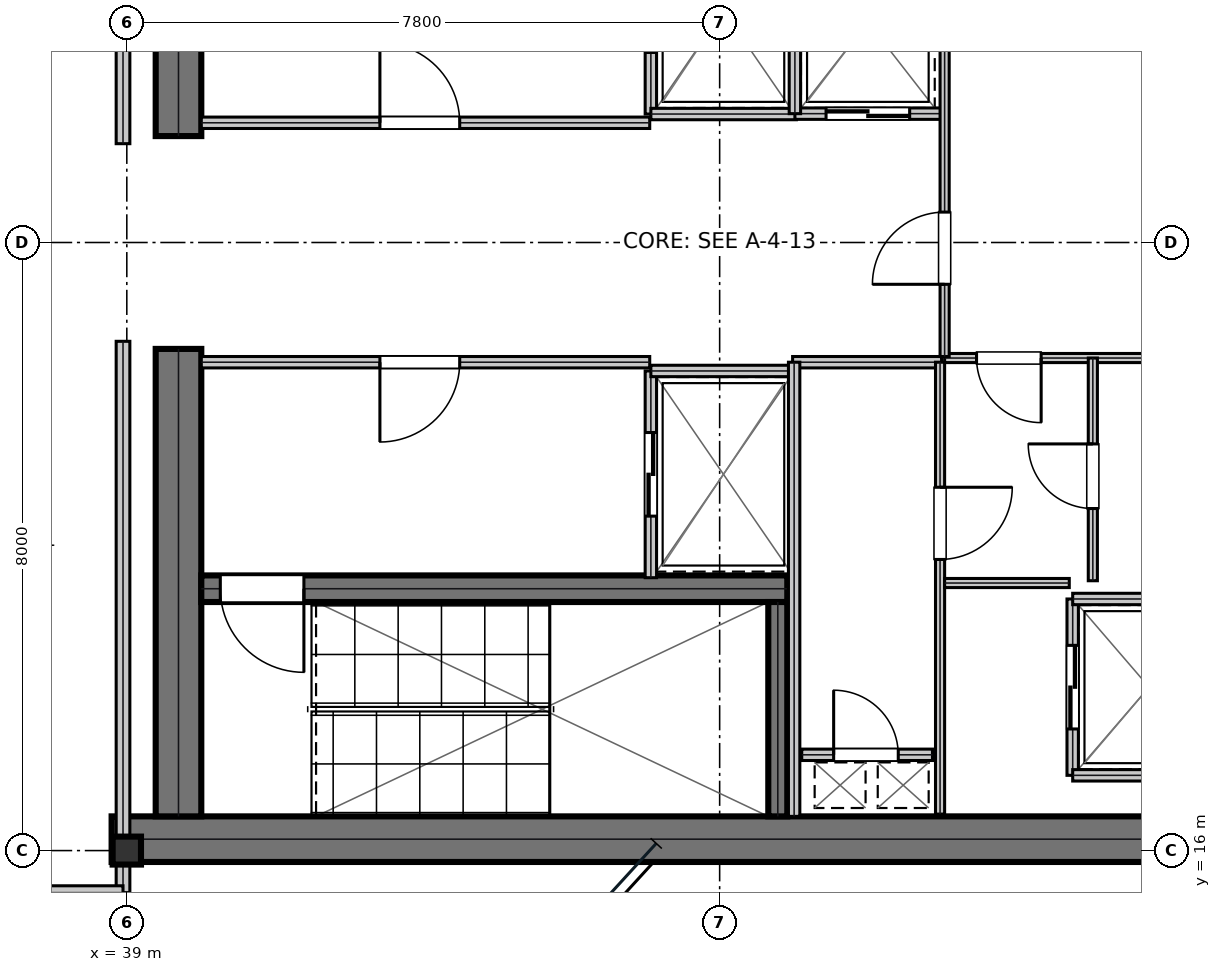
"""IFC4 building model, lengths in metres.
Left out: names, types, materials, properties, quantities, classifications, styles, units other than length and angle.
Written with IfcOpenShell. Run it as: python <this file> out.ifc"""

import sys

from ifc_helpers import new_model, si_unit, direction, frame, frame_2d, origin, origin_2d, place, context, subcontext, project, spatial, rectangle, i_section, extrude, element, fill, save


model = new_model("IFC4")
c1 = context("Model", 3, precision=1e-05, world=origin(), true_north=direction((0.0, 1.0)))
c2 = subcontext(c1, "Body", "Model", "MODEL_VIEW")
j1 = project(units=[si_unit("LENGTHUNIT", "METRE"), si_unit("PLANEANGLEUNIT", "RADIAN")], contexts=[c1])
p1 = place(None, origin())
s1 = spatial("IfcSite", under=j1, at=p1, CompositionType="ELEMENT")
p2 = place(p1, origin())
s2 = spatial("IfcBuilding", under=s1, at=p2, CompositionType="ELEMENT")
p3 = place(p2, frame((0.0, 0.0, 287.1)))
s3 = spatial("IfcBuildingStorey", under=s2, at=p3, CompositionType="ELEMENT", Elevation=287.1)
p4 = place(p3, frame((38.8, 16.15, 0.0), z_axis=(0.0, 0.0, 1.0), x_axis=(1.0, 0.0, 0.0)))
e1 = element("IfcWall", 1, at=p4, inside=s3, PredefinedType="SHEAR", context=c2, shape_type="SweptSolid", body=[
    extrude(rectangle(XDim=16.0, YDim=0.6, at=frame_2d((8.0, 0.0))), origin(), (0.0, 0.0, 1.0), 3.81),
])
for number, where, z_axis, x_axis in (
    (2, (39.68, 16.45, 0.0), (0.0, 0.0, 1.0), (0.0, 1.0, 0.0)),
    (3, (39.68, 25.4, 0.0), (0.0, 0.0, 1.0), (0.0, 1.0, 0.0)),
):
    element("IfcWall", number, at=place(p3, frame(where, z_axis=z_axis, x_axis=x_axis)), inside=s3, PredefinedType="SHEAR", context=c2, shape_type="SweptSolid", body=[
        extrude(rectangle(XDim=6.15, YDim=0.6, at=frame_2d((3.075, 0.0))), origin(), (0.0, 0.0, 1.0), 3.81),
    ])
p5 = place(p3, frame((39.98, 19.445, 0.0), z_axis=(0.0, 0.0, 1.0), x_axis=(1.0, 0.0, 0.0)))
e4 = element("IfcWall", 4, at=p5, inside=s3, PredefinedType="SHEAR", context=c2, shape_type="SweptSolid", body=[
    extrude(rectangle(XDim=7.71, YDim=0.35, at=frame_2d((3.855, 0.0))), origin(), (0.0, 0.0, 1.0), 3.81),
])
p6 = place(p5, frame((0.25, 0.0, 0.0)))
e5 = element("IfcOpeningElement", 5, at=p6, cuts=e4, PredefinedType="OPENING", context=c2, shape_type="SweptSolid", body=[
    extrude(rectangle(XDim=1.1, YDim=2.15, at=frame_2d((0.55, 1.075))), frame((0.0, 0.185, 0.0), z_axis=(0.0, -1.0, 0.0), x_axis=(1.0, 0.0, 0.0)), (0.0, 0.0, 1.0), 0.37),
])
p7 = place(p3, frame((47.565, 16.45, 0.0), z_axis=(0.0, 0.0, 1.0), x_axis=(0.0, 1.0, 0.0)))
e6 = element("IfcWall", 6, at=p7, inside=s3, PredefinedType="SHEAR", context=c2, shape_type="SweptSolid", body=[
    extrude(rectangle(XDim=2.82, YDim=0.25, at=frame_2d((1.41, 0.0))), origin(), (0.0, 0.0, 1.0), 3.81),
])
p8 = place(p3, frame((39.0, 16.0, 0.0), z_axis=(0.0, 0.0, 1.0), x_axis=(1.0, 0.0, 0.0)))
e7 = element("IfcColumn", 7, at=p8, inside=s3, PredefinedType="COLUMN", context=c2, shape_type="SweptSolid", body=[
    extrude(i_section(OverallWidth=0.373, OverallDepth=0.368, WebThickness=0.015, FlangeThickness=0.024, at=origin_2d()), origin(), (0.0, 0.0, 1.0), 4.044),
])
p9 = place(p3, frame((39.98, 25.575, 0.0), z_axis=(0.0, 0.0, 1.0), x_axis=(1.0, 0.0, 0.0)))
e8 = element("IfcWall", 8, at=p9, inside=s3, PredefinedType="PARTITIONING", context=c2, shape_type="SweptSolid", body=[
    extrude(rectangle(XDim=5.9, YDim=0.15, at=frame_2d((2.95, 0.0))), origin(), (0.0, 0.0, 1.0), 3.81),
])
p10 = place(p9, frame((2.35, 0.0, 0.0)))
e9 = element("IfcOpeningElement", 9, at=p10, cuts=e8, PredefinedType="OPENING", context=c2, shape_type="SweptSolid", body=[
    extrude(rectangle(XDim=1.05, YDim=2.15, at=frame_2d((0.525, 1.075))), frame((0.0, 0.085, 0.0), z_axis=(0.0, -1.0, 0.0), x_axis=(1.0, 0.0, 0.0)), (0.0, 0.0, 1.0), 0.17),
])
p11 = place(p3, frame((39.98, 22.425, 0.0), z_axis=(0.0, 0.0, 1.0), x_axis=(1.0, 0.0, 0.0)))
e10 = element("IfcWall", 10, at=p11, inside=s3, PredefinedType="PARTITIONING", context=c2, shape_type="SweptSolid", body=[
    extrude(rectangle(XDim=5.9, YDim=0.15, at=frame_2d((2.95, 0.0))), origin(), (0.0, 0.0, 1.0), 3.81),
])
p12 = place(p11, frame((2.35, 0.0, 0.0)))
e11 = element("IfcOpeningElement", 11, at=p12, cuts=e10, PredefinedType="OPENING", context=c2, shape_type="SweptSolid", body=[
    extrude(rectangle(XDim=1.05, YDim=2.15, at=frame_2d((0.525, 1.075))), frame((0.0, 0.085, 0.0), z_axis=(0.0, -1.0, 0.0), x_axis=(1.0, 0.0, 0.0)), (0.0, 0.0, 1.0), 0.17),
])
p13 = place(p3, frame((45.895, 25.69, 0.0), z_axis=(0.0, 0.0, 1.0), x_axis=(0.0, 1.0, 0.0)))
e12 = element("IfcWall", 12, at=p13, inside=s3, PredefinedType="PARTITIONING", context=c2, shape_type="SweptSolid", body=[
    extrude(rectangle(XDim=2.72, YDim=0.15, at=frame_2d((1.36, 0.0))), origin(), (0.0, 0.0, 1.0), 3.81),
])
p14 = place(p13, frame((0.81, 0.0, 0.0)))
e13 = element("IfcOpeningElement", 13, at=p14, cuts=e12, PredefinedType="OPENING", context=c2, shape_type="SweptSolid", body=[
    extrude(rectangle(XDim=1.1, YDim=2.15, at=frame_2d((0.55, 1.075))), frame((0.0, 0.085, 0.0), z_axis=(0.0, -1.0, 0.0), x_axis=(1.0, 0.0, 0.0)), (0.0, 0.0, 1.0), 0.17),
])
p15 = place(p3, frame((45.895, 25.69, 0.0), z_axis=(0.0, 0.0, 1.0), x_axis=(1.0, 0.0, 0.0)))
e14 = element("IfcWall", 14, at=p15, inside=s3, PredefinedType="PARTITIONING", context=c2, shape_type="SweptSolid", body=[
    extrude(rectangle(XDim=1.915, YDim=0.15, at=frame_2d((0.958, 0.0))), origin(), (0.0, 0.0, 1.0), 3.81),
])
p16 = place(p3, frame((45.895, 19.59, 0.0), z_axis=(0.0, 0.0, 1.0), x_axis=(0.0, 1.0, 0.0)))
e15 = element("IfcWall", 15, at=p16, inside=s3, PredefinedType="PARTITIONING", context=c2, shape_type="SweptSolid", body=[
    extrude(rectangle(XDim=2.72, YDim=0.15, at=frame_2d((1.36, 0.0))), origin(), (0.0, 0.0, 1.0), 3.81),
])
p17 = place(p16, frame((0.81, 0.0, 0.0)))
e16 = element("IfcOpeningElement", 16, at=p17, cuts=e15, PredefinedType="OPENING", context=c2, shape_type="SweptSolid", body=[
    extrude(rectangle(XDim=1.1, YDim=2.15, at=frame_2d((0.55, 1.075))), frame((0.0, 0.085, 0.0), z_axis=(0.0, -1.0, 0.0), x_axis=(1.0, 0.0, 0.0)), (0.0, 0.0, 1.0), 0.17),
])
p18 = place(p3, frame((45.895, 22.31, 0.0), z_axis=(0.0, 0.0, 1.0), x_axis=(1.0, 0.0, 0.0)))
e17 = element("IfcWall", 17, at=p18, inside=s3, PredefinedType="PARTITIONING", context=c2, shape_type="SweptSolid", body=[
    extrude(rectangle(XDim=1.915, YDim=0.15, at=frame_2d((0.958, 0.0))), origin(), (0.0, 0.0, 1.0), 3.81),
])
p19 = place(p3, frame((47.79, 25.695, 0.0), z_axis=(0.0, 0.0, 1.0), x_axis=(1.0, 0.0, 0.0)))
e18 = element("IfcWall", 18, at=p19, inside=s3, PredefinedType="PARTITIONING", context=c2, shape_type="SweptSolid", body=[
    extrude(rectangle(XDim=1.92, YDim=0.15, at=frame_2d((0.96, 0.0))), origin(), (0.0, 0.0, 1.0), 3.81),
])
p20 = place(p19, frame((0.41, 0.0, 0.0)))
e19 = element("IfcOpeningElement", 19, at=p20, cuts=e18, PredefinedType="OPENING", context=c2, shape_type="SweptSolid", body=[
    extrude(rectangle(XDim=1.1, YDim=2.15, at=frame_2d((0.55, 1.075))), frame((0.0, 0.085, 0.0), z_axis=(0.0, -1.0, 0.0), x_axis=(1.0, 0.0, 0.0)), (0.0, 0.0, 1.0), 0.17),
])
p21 = place(p3, frame((47.79, 25.695, 0.0), z_axis=(0.0, 0.0, 1.0), x_axis=(0.0, 1.0, 0.0)))
e20 = element("IfcWall", 20, at=p21, inside=s3, PredefinedType="PARTITIONING", context=c2, shape_type="SweptSolid", body=[
    extrude(rectangle(XDim=2.415, YDim=0.15, at=frame_2d((1.208, 0.0))), origin(), (0.0, 0.0, 1.0), 3.81),
])
p22 = place(p3, frame((51.445, 16.99, 0.0), z_axis=(0.0, 0.0, 1.0), x_axis=(0.0, 1.0, 0.0)))
e21 = element("IfcWall", 21, at=p22, inside=s3, PredefinedType="PARTITIONING", context=c2, shape_type="SweptSolid", body=[
    extrude(rectangle(XDim=2.32, YDim=0.15, at=frame_2d((1.16, 0.0))), origin(), (0.0, 0.0, 1.0), 3.81),
])
p23 = place(p22, frame((0.61, 0.0, 0.0)))
e22 = element("IfcOpeningElement", 22, at=p23, cuts=e21, PredefinedType="OPENING", context=c2, shape_type="SweptSolid", body=[
    extrude(rectangle(XDim=1.1, YDim=2.15, at=frame_2d((0.55, 1.075))), frame((0.0, 0.085, 0.0), z_axis=(0.0, -1.0, 0.0), x_axis=(1.0, 0.0, 0.0)), (0.0, 0.0, 1.0), 0.17),
])
for number, where, z_axis, x_axis in (
    (23, (51.445, 16.99, 0.0), (0.0, 0.0, 1.0), (1.0, 0.0, 0.0)),
    (24, (51.445, 19.31, 0.0), (0.0, 0.0, 1.0), (1.0, 0.0, 0.0)),
):
    element("IfcWall", number, at=place(p3, frame(where, z_axis=z_axis, x_axis=x_axis)), inside=s3, PredefinedType="PARTITIONING", context=c2, shape_type="SweptSolid", body=[
        extrude(rectangle(XDim=2.015, YDim=0.15, at=frame_2d((1.007, 0.0))), origin(), (0.0, 0.0, 1.0), 3.81),
    ])
p24 = place(p3, frame((47.88, 17.26, 0.0), z_axis=(0.0, 0.0, 1.0), x_axis=(1.0, 0.0, 0.0)))
e25 = element("IfcWall", 25, at=p24, inside=s3, PredefinedType="PARTITIONING", context=c2, shape_type="SweptSolid", body=[
    extrude(rectangle(XDim=1.72, YDim=0.15, at=frame_2d((0.86, 0.0))), origin(), (0.0, 0.0, 1.0), 3.81),
])
p25 = place(p24, frame((0.42, 0.0, 0.0)))
e26 = element("IfcOpeningElement", 26, at=p25, cuts=e25, PredefinedType="OPENING", context=c2, shape_type="SweptSolid", body=[
    extrude(rectangle(XDim=0.85, YDim=2.15, at=frame_2d((0.425, 1.075))), frame((0.0, 0.085, 0.0), z_axis=(0.0, -1.0, 0.0), x_axis=(1.0, 0.0, 0.0)), (0.0, 0.0, 1.0), 0.17),
])
p26 = place(p3, frame((47.76, 22.425, 0.0), z_axis=(0.0, 0.0, 1.0), x_axis=(1.0, 0.0, 0.0)))
e27 = element("IfcWall", 27, at=p26, inside=s3, PredefinedType="PARTITIONING", context=c2, shape_type="SweptSolid", body=[
    extrude(rectangle(XDim=1.96, YDim=0.15, at=frame_2d((0.98, 0.0))), origin(), (0.0, 0.0, 1.0), 3.81),
])
p27 = place(p3, frame((47.78, 16.45, 0.0), z_axis=(0.0, 0.0, 1.0), x_axis=(0.0, 1.0, 0.0)))
e28 = element("IfcWall", 28, at=p27, inside=s3, PredefinedType="PARTITIONING", context=c2, shape_type="SweptSolid", body=[
    extrude(rectangle(XDim=5.975, YDim=0.15, at=frame_2d((2.988, 0.0))), origin(), (0.0, 0.0, 1.0), 3.81),
])
p28 = place(p3, frame((49.7, 16.48, 0.0), z_axis=(0.0, 0.0, 1.0), x_axis=(0.0, 1.0, 0.0)))
e29 = element("IfcWall", 29, at=p28, inside=s3, PredefinedType="PARTITIONING", context=c2, shape_type="SweptSolid", body=[
    extrude(rectangle(XDim=5.945, YDim=0.12, at=frame_2d((2.973, 0.0))), origin(), (0.0, 0.0, 1.0), 3.81),
])
p29 = place(p28, frame((3.35, 0.0, 0.0)))
e30 = element("IfcOpeningElement", 30, at=p29, cuts=e29, PredefinedType="OPENING", context=c2, shape_type="SweptSolid", body=[
    extrude(rectangle(XDim=0.95, YDim=2.15, at=frame_2d((0.475, 1.075))), frame((0.0, 0.07, 0.0), z_axis=(0.0, -1.0, 0.0), x_axis=(1.0, 0.0, 0.0)), (0.0, 0.0, 1.0), 0.14),
])
p30 = place(p3, frame((49.76, 22.48, 0.0), z_axis=(0.0, 0.0, 1.0), x_axis=(1.0, 0.0, 0.0)))
e31 = element("IfcWall", 31, at=p30, inside=s3, PredefinedType="PARTITIONING", context=c2, shape_type="SweptSolid", body=[
    extrude(rectangle(XDim=3.9, YDim=0.12, at=frame_2d((1.95, 0.0))), origin(), (0.0, 0.0, 1.0), 3.81),
])
p31 = place(p30, frame((0.42, 0.0, 0.0)))
e32 = element("IfcOpeningElement", 32, at=p31, cuts=e31, PredefinedType="OPENING", context=c2, shape_type="SweptSolid", body=[
    extrude(rectangle(XDim=0.85, YDim=2.15, at=frame_2d((0.425, 1.075))), frame((0.0, 0.07, 0.0), z_axis=(0.0, -1.0, 0.0), x_axis=(1.0, 0.0, 0.0)), (0.0, 0.0, 1.0), 0.14),
])
p32 = place(p3, frame((51.71, 19.55, 0.0), z_axis=(0.0, 0.0, 1.0), x_axis=(0.0, 1.0, 0.0)))
e33 = element("IfcWall", 33, at=p32, inside=s3, PredefinedType="PARTITIONING", context=c2, shape_type="SweptSolid", body=[
    extrude(rectangle(XDim=2.93, YDim=0.12, at=frame_2d((1.465, 0.0))), origin(), (0.0, 0.0, 1.0), 3.81),
])
p33 = place(p32, frame((0.95, 0.0, 0.0)))
e34 = element("IfcOpeningElement", 34, at=p33, cuts=e33, PredefinedType="OPENING", context=c2, shape_type="SweptSolid", body=[
    extrude(rectangle(XDim=0.85, YDim=2.15, at=frame_2d((0.425, 1.075))), frame((0.0, 0.07, 0.0), z_axis=(0.0, -1.0, 0.0), x_axis=(1.0, 0.0, 0.0)), (0.0, 0.0, 1.0), 0.14),
])
p34 = place(p3, frame((49.76, 19.52, 0.0), z_axis=(0.0, 0.0, 1.0), x_axis=(1.0, 0.0, 0.0)))
e35 = element("IfcWall", 35, at=p34, inside=s3, PredefinedType="PARTITIONING", context=c2, shape_type="SweptSolid", body=[
    extrude(rectangle(XDim=1.64, YDim=0.12, at=frame_2d((0.82, 0.0))), origin(), (0.0, 0.0, 1.0), 3.81),
])
p35 = place(p3, frame((49.76, 22.5, 0.0), z_axis=(0.0, 0.0, 1.0), x_axis=(0.0, 1.0, 0.0)))
e36 = element("IfcWall", 36, at=p35, inside=s3, PredefinedType="PARTITIONING", context=c2, shape_type="SweptSolid", body=[
    extrude(rectangle(XDim=5.72, YDim=0.12, at=frame_2d((2.86, 0.0))), origin(), (0.0, 0.0, 1.0), 3.81),
])
p36 = place(p35, frame((0.95, 0.0, 0.0)))
e37 = element("IfcOpeningElement", 37, at=p36, cuts=e36, PredefinedType="OPENING", context=c2, shape_type="SweptSolid", body=[
    extrude(rectangle(XDim=0.95, YDim=2.15, at=frame_2d((0.475, 1.075))), frame((0.0, 0.07, 0.0), z_axis=(0.0, -1.0, 0.0), x_axis=(1.0, 0.0, 0.0)), (0.0, 0.0, 1.0), 0.14),
])
p37 = place(p3, frame((38.95, 15.447, 0.0), z_axis=(0.0, 0.0, 1.0), x_axis=(0.0, 1.0, 0.0)))
e38 = element("IfcWall", 38, at=p37, inside=s3, PredefinedType="SOLIDWALL", context=c2, shape_type="SweptSolid", body=[
    extrude(rectangle(XDim=7.253, YDim=0.18, at=frame_2d((3.626, 0.0))), origin(), (0.0, 0.0, 1.0), 3.27),
])
p38 = place(p3, frame((37.05, 15.447, 0.0), z_axis=(0.0, 0.0, 1.0), x_axis=(1.0, 0.0, 0.0)))
e39 = element("IfcWall", 39, at=p38, inside=s3, PredefinedType="SOLIDWALL", context=c2, shape_type="SweptSolid", body=[
    extrude(rectangle(XDim=1.9, YDim=0.18, at=frame_2d((0.95, 0.0))), origin(), (0.0, 0.0, 1.0), 3.27),
])
p39 = place(p3, frame((38.95, 25.3, 0.0), z_axis=(0.0, 0.0, 1.0), x_axis=(0.0, 1.0, 0.0)))
e40 = element("IfcWall", 40, at=p39, inside=s3, PredefinedType="SOLIDWALL", context=c2, shape_type="SweptSolid", body=[
    extrude(rectangle(XDim=7.253, YDim=0.18, at=frame_2d((3.626, 0.0))), origin(), (0.0, 0.0, 1.0), 3.27),
])
p40 = place(p10, origin())
e41 = element("IfcDoor", 41, at=p40, inside=s3, OperationType="SINGLE_SWING_LEFT", PredefinedType="DOOR", context=c2, shape_type="SweptSolid", body=[
    extrude(rectangle(XDim=1.05, YDim=2.15, at=frame_2d((0.525, 1.075))), frame((0.0, 0.025, 0.0), z_axis=(0.0, -1.0, 0.0), x_axis=(1.0, 0.0, 0.0)), (0.0, 0.0, 1.0), 0.05),
])
fill(e9, e41)
p41 = place(p12, frame((1.05, 0.0, 0.0), z_axis=(0.0, 0.0, 1.0), x_axis=(-1.0, 0.0, 0.0)))
e42 = element("IfcDoor", 42, at=p41, inside=s3, OperationType="SINGLE_SWING_RIGHT", PredefinedType="DOOR", context=c2, shape_type="SweptSolid", body=[
    extrude(rectangle(XDim=1.05, YDim=2.15, at=frame_2d((0.525, 1.075))), frame((0.0, 0.025, 0.0), z_axis=(0.0, -1.0, 0.0), x_axis=(1.0, 0.0, 0.0)), (0.0, 0.0, 1.0), 0.05),
])
fill(e11, e42)
p42 = place(p17, frame((1.1, 0.0, 0.0), z_axis=(0.0, 0.0, 1.0), x_axis=(-1.0, 0.0, 0.0)))
e43 = element("IfcDoor", 43, at=p42, inside=s3, OperationType="DOUBLE_DOOR_SLIDING", PredefinedType="DOOR", context=c2, shape_type="SweptSolid", body=[
    extrude(rectangle(XDim=1.1, YDim=2.15, at=frame_2d((0.55, 1.075))), frame((0.0, 0.025, 0.0), z_axis=(0.0, -1.0, 0.0), x_axis=(1.0, 0.0, 0.0)), (0.0, 0.0, 1.0), 0.05),
])
fill(e16, e43)
p43 = place(p20, frame((1.1, 0.0, 0.0), z_axis=(0.0, 0.0, 1.0), x_axis=(-1.0, 0.0, 0.0)))
e44 = element("IfcDoor", 44, at=p43, inside=s3, OperationType="DOUBLE_DOOR_SLIDING", PredefinedType="DOOR", context=c2, shape_type="SweptSolid", body=[
    extrude(rectangle(XDim=1.1, YDim=2.15, at=frame_2d((0.55, 1.075))), frame((0.0, 0.025, 0.0), z_axis=(0.0, -1.0, 0.0), x_axis=(1.0, 0.0, 0.0)), (0.0, 0.0, 1.0), 0.05),
])
fill(e19, e44)
p44 = place(p23, frame((1.1, 0.0, 0.0), z_axis=(0.0, 0.0, 1.0), x_axis=(-1.0, 0.0, 0.0)))
e45 = element("IfcDoor", 45, at=p44, inside=s3, OperationType="DOUBLE_DOOR_SLIDING", PredefinedType="DOOR", context=c2, shape_type="SweptSolid", body=[
    extrude(rectangle(XDim=1.1, YDim=2.15, at=frame_2d((0.55, 1.075))), frame((0.0, 0.025, 0.0), z_axis=(0.0, -1.0, 0.0), x_axis=(1.0, 0.0, 0.0)), (0.0, 0.0, 1.0), 0.05),
])
fill(e22, e45)
p45 = place(p25, origin())
e46 = element("IfcDoor", 46, at=p45, inside=s3, OperationType="SINGLE_SWING_LEFT", PredefinedType="TRAPDOOR", context=c2, shape_type="SweptSolid", body=[
    extrude(rectangle(XDim=0.85, YDim=2.15, at=frame_2d((0.425, 1.075))), frame((0.0, 0.025, 0.0), z_axis=(0.0, -1.0, 0.0), x_axis=(1.0, 0.0, 0.0)), (0.0, 0.0, 1.0), 0.05),
])
fill(e26, e46)
p46 = place(p29, frame((0.95, 0.0, 0.0), z_axis=(0.0, 0.0, 1.0), x_axis=(-1.0, 0.0, 0.0)))
e47 = element("IfcDoor", 47, at=p46, inside=s3, OperationType="SINGLE_SWING_LEFT", PredefinedType="DOOR", context=c2, shape_type="SweptSolid", body=[
    extrude(rectangle(XDim=0.95, YDim=2.15, at=frame_2d((0.475, 1.075))), frame((0.0, 0.025, 0.0), z_axis=(0.0, -1.0, 0.0), x_axis=(1.0, 0.0, 0.0)), (0.0, 0.0, 1.0), 0.05),
])
fill(e30, e47)
p47 = place(p31, frame((0.85, 0.0, 0.0), z_axis=(0.0, 0.0, 1.0), x_axis=(-1.0, 0.0, 0.0)))
e48 = element("IfcDoor", 48, at=p47, inside=s3, OperationType="SINGLE_SWING_LEFT", PredefinedType="DOOR", context=c2, shape_type="SweptSolid", body=[
    extrude(rectangle(XDim=0.85, YDim=2.15, at=frame_2d((0.425, 1.075))), frame((0.0, 0.025, 0.0), z_axis=(0.0, -1.0, 0.0), x_axis=(1.0, 0.0, 0.0)), (0.0, 0.0, 1.0), 0.05),
])
fill(e32, e48)
p48 = place(p33, origin())
e49 = element("IfcDoor", 49, at=p48, inside=s3, OperationType="SINGLE_SWING_RIGHT", PredefinedType="DOOR", context=c2, shape_type="SweptSolid", body=[
    extrude(rectangle(XDim=0.85, YDim=2.15, at=frame_2d((0.425, 1.075))), frame((0.0, 0.025, 0.0), z_axis=(0.0, -1.0, 0.0), x_axis=(1.0, 0.0, 0.0)), (0.0, 0.0, 1.0), 0.05),
])
fill(e34, e49)
p49 = place(p36, origin())
e50 = element("IfcDoor", 50, at=p49, inside=s3, OperationType="SINGLE_SWING_LEFT", PredefinedType="DOOR", context=c2, shape_type="SweptSolid", body=[
    extrude(rectangle(XDim=0.95, YDim=2.15, at=frame_2d((0.475, 1.075))), frame((0.0, 0.025, 0.0), z_axis=(0.0, -1.0, 0.0), x_axis=(1.0, 0.0, 0.0)), (0.0, 0.0, 1.0), 0.05),
])
fill(e37, e50)
p50 = place(p6, frame((1.1, 0.0, 0.0), z_axis=(0.0, 0.0, 1.0), x_axis=(-1.0, 0.0, 0.0)))
e51 = element("IfcDoor", 51, at=p50, inside=s3, OperationType="SINGLE_SWING_LEFT", PredefinedType="DOOR", context=c2, shape_type="SweptSolid", body=[
    extrude(rectangle(XDim=1.1, YDim=2.15, at=frame_2d((0.55, 1.075))), frame((0.0, 0.025, 0.0), z_axis=(0.0, -1.0, 0.0), x_axis=(1.0, 0.0, 0.0)), (0.0, 0.0, 1.0), 0.05),
])
fill(e5, e51)
save(model, sys.argv[1])
